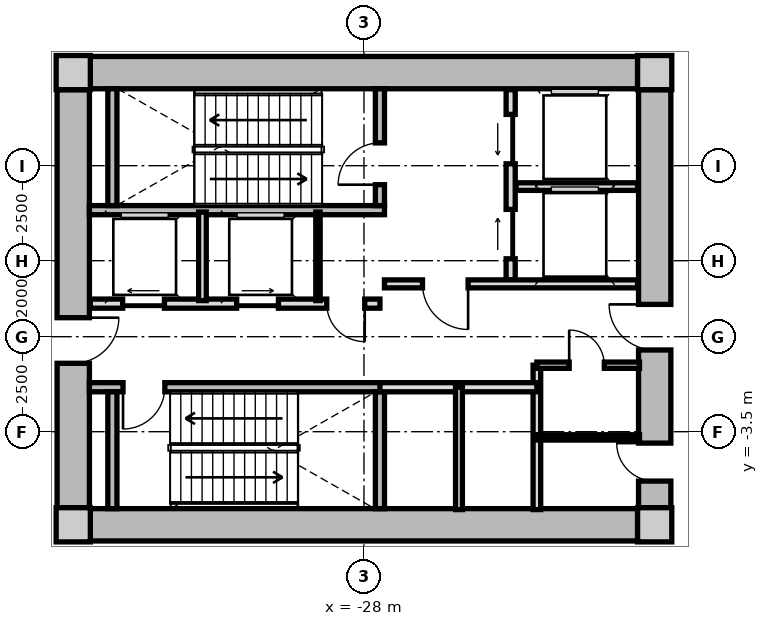
"""IFC4 building model, lengths in metres.
Left out: names, types, materials, properties, quantities, classifications, styles, units other than length and angle.
Written with IfcOpenShell. Run it as: python <this file> out.ifc"""

import sys

from ifc_helpers import new_model, si_unit, direction, frame, frame_2d, origin, origin_2d, place, context, subcontext, project, spatial, rectangle, extrude, source, transform, mapped, element, fill, save


model = new_model("IFC4")
c1 = context("Model", 3, precision=1e-05, world=origin(), true_north=direction((0.0, 1.0)))
c2 = subcontext(c1, "Body", "Model", "MODEL_VIEW")
j1 = project(units=[si_unit("LENGTHUNIT", "METRE"), si_unit("PLANEANGLEUNIT", "RADIAN")], contexts=[c1])
p1 = place(None, origin())
s1 = spatial("IfcSite", under=j1, at=p1, CompositionType="ELEMENT")
p2 = place(p1, origin())
s2 = spatial("IfcBuilding", under=s1, at=p2, CompositionType="ELEMENT")
p3 = place(p2, frame((0.0, 0.0, 16.8)))
s3 = spatial("IfcBuildingStorey", under=s2, at=p3, CompositionType="ELEMENT", Elevation=16.8)
m1 = source(origin(), c2, "Body", "SweptSolid", [
    extrude(rectangle(XDim=0.9, YDim=0.9, at=origin_2d()), origin(), (0.0, 0.0, 1.0), 4.8),
])
for number, where, z_axis, x_axis in (
    (1, (-35.65, -5.95, 0.0), (0.0, 0.0, 1.0), (1.0, 0.0, 0.0)),
    (2, (-20.35, -5.95, 0.0), (0.0, 0.0, 1.0), (1.0, 0.0, 0.0)),
    (3, (-20.35, 5.95, 0.0), (0.0, 0.0, 1.0), (1.0, 0.0, 0.0)),
    (4, (-35.65, 5.95, 0.0), (0.0, 0.0, 1.0), (1.0, 0.0, 0.0)),
):
    element("IfcColumn", number, at=place(p3, frame(where, z_axis=z_axis, x_axis=x_axis)), inside=s3, PredefinedType="COLUMN", context=c2, shape_type="MappedRepresentation", body=[
        mapped(m1, transform((0.0, 0.0, 0.0), x_axis=(1.0, 0.0, 0.0), y_axis=(0.0, 1.0, 0.0), z_axis=(0.0, 0.0, 1.0), scale=1.0)),
    ])
m2 = source(origin(), c2, "Body", "SweptSolid", [
    extrude(rectangle(XDim=14.4, YDim=0.85, at=frame_2d((7.2, 0.0))), origin(), (0.0, 0.0, 1.0), 4.38),
])
for number, where, z_axis, x_axis in (
    (5, (-35.2, 5.95, 0.0), (0.0, 0.0, 1.0), (1.0, 0.0, 0.0)),
    (6, (-20.8, -5.95, 0.0), (0.0, 0.0, 1.0), (-1.0, 0.0, 0.0)),
):
    element("IfcWall", number, at=place(p3, frame(where, z_axis=z_axis, x_axis=x_axis)), inside=s3, PredefinedType="SHEAR", context=c2, shape_type="MappedRepresentation", body=[
        mapped(m2, transform((0.0, 0.0, 0.0), x_axis=(1.0, 0.0, 0.0), y_axis=(0.0, 1.0, 0.0), z_axis=(0.0, 0.0, 1.0), scale=1.0)),
    ])
m3 = source(origin(), c2, "Body", "SweptSolid", [
    extrude(rectangle(XDim=11.0, YDim=0.85, at=frame_2d((5.5, 0.0))), origin(), (0.0, 0.0, 1.0), 4.38),
])
p4 = place(p3, frame((-35.65, -5.5, 0.0), z_axis=(0.0, 0.0, 1.0), x_axis=(0.0, 1.0, 0.0)))
e7 = element("IfcWall", 7, at=p4, inside=s3, PredefinedType="SHEAR", context=c2, shape_type="MappedRepresentation", body=[
    mapped(m3, transform((0.0, 0.0, 0.0), x_axis=(1.0, 0.0, 0.0), y_axis=(0.0, 1.0, 0.0), z_axis=(0.0, 0.0, 1.0), scale=1.0)),
])
p5 = place(p4, frame((3.8, 0.0, 0.0)))
e8 = element("IfcOpeningElement", 8, at=p5, cuts=e7, PredefinedType="OPENING", context=c2, shape_type="SweptSolid", body=[
    extrude(rectangle(XDim=1.2, YDim=2.15, at=frame_2d((0.6, 1.075))), frame((0.0, 0.435, 0.0), z_axis=(0.0, -1.0, 0.0), x_axis=(1.0, 0.0, 0.0)), (0.0, 0.0, 1.0), 0.87),
])
p6 = place(p3, frame((-20.35, 5.5, 0.0), z_axis=(0.0, 0.0, 1.0), x_axis=(0.0, -1.0, 0.0)))
e9 = element("IfcWall", 9, at=p6, inside=s3, PredefinedType="SHEAR", context=c2, shape_type="MappedRepresentation", body=[
    mapped(m3, transform((0.0, 0.0, 0.0), x_axis=(1.0, 0.0, 0.0), y_axis=(0.0, 1.0, 0.0), z_axis=(0.0, 0.0, 1.0), scale=1.0)),
])
p7 = place(p6, frame((5.65, 0.0, 0.0)))
e10 = element("IfcOpeningElement", 10, at=p7, cuts=e9, PredefinedType="OPENING", context=c2, shape_type="SweptSolid", body=[
    extrude(rectangle(XDim=1.2, YDim=2.15, at=frame_2d((0.6, 1.075))), frame((0.0, 0.435, 0.0), z_axis=(0.0, -1.0, 0.0), x_axis=(1.0, 0.0, 0.0)), (0.0, 0.0, 1.0), 0.87),
])
p8 = place(p6, frame((9.3, 0.0, 0.0)))
e11 = element("IfcOpeningElement", 11, at=p8, cuts=e9, PredefinedType="OPENING", context=c2, shape_type="SweptSolid", body=[
    extrude(rectangle(XDim=1.0, YDim=2.1, at=frame_2d((0.5, 1.05))), frame((0.0, 0.435, 0.0), z_axis=(0.0, -1.0, 0.0), x_axis=(1.0, 0.0, 0.0)), (0.0, 0.0, 1.0), 0.87),
])
m4 = source(origin(), c2, "Body", "SweptSolid", [
    extrude(rectangle(XDim=7.765, YDim=0.24, at=frame_2d((3.883, 0.0))), origin(), (0.0, 0.0, 1.0), 4.38),
])
p9 = place(p3, frame((-35.225, 2.33, 0.0), z_axis=(0.0, 0.0, 1.0), x_axis=(1.0, 0.0, 0.0)))
e12 = element("IfcWall", 12, at=p9, inside=s3, PredefinedType="PARTITIONING", context=c2, shape_type="MappedRepresentation", body=[
    mapped(m4, transform((0.0, 0.0, 0.0), x_axis=(1.0, 0.0, 0.0), y_axis=(0.0, 1.0, 0.0), z_axis=(0.0, 0.0, 1.0), scale=1.0)),
])
m5 = source(origin(), c2, "Body", "SweptSolid", [
    extrude(rectangle(XDim=3.075, YDim=0.24, at=frame_2d((1.538, 0.0))), origin(), (0.0, 0.0, 1.0), 4.38),
])
p10 = place(p3, frame((-34.62, 2.45, 0.0), z_axis=(0.0, 0.0, 1.0), x_axis=(0.0, 1.0, 0.0)))
e13 = element("IfcWall", 13, at=p10, inside=s3, PredefinedType="PARTITIONING", context=c2, shape_type="MappedRepresentation", body=[
    mapped(m5, transform((0.0, 0.0, 0.0), x_axis=(1.0, 0.0, 0.0), y_axis=(0.0, 1.0, 0.0), z_axis=(0.0, 0.0, 1.0), scale=1.0)),
])
p11 = place(p3, frame((-27.58, 2.45, 0.0), z_axis=(0.0, 0.0, 1.0), x_axis=(0.0, 1.0, 0.0)))
e14 = element("IfcWall", 14, at=p11, inside=s3, PredefinedType="PARTITIONING", context=c2, shape_type="MappedRepresentation", body=[
    mapped(m5, transform((0.0, 0.0, 0.0), x_axis=(1.0, 0.0, 0.0), y_axis=(0.0, 1.0, 0.0), z_axis=(0.0, 0.0, 1.0), scale=1.0)),
])
p12 = place(p11, frame((0.55, 0.0, 0.0)))
e15 = element("IfcOpeningElement", 15, at=p12, cuts=e14, PredefinedType="OPENING", context=c2, shape_type="SweptSolid", body=[
    extrude(rectangle(XDim=1.1, YDim=2.15, at=frame_2d((0.55, 1.075))), frame((0.0, 0.13, 0.0), z_axis=(0.0, -1.0, 0.0), x_axis=(1.0, 0.0, 0.0)), (0.0, 0.0, 1.0), 0.26),
])
p13 = place(p3, frame((-35.225, -2.33, 0.0), z_axis=(0.0, 0.0, 1.0), x_axis=(1.0, 0.0, 0.0)))
e16 = element("IfcWall", 16, at=p13, inside=s3, PredefinedType="PARTITIONING", context=c2, shape_type="MappedRepresentation", body=[
    mapped(m4, transform((0.0, 0.0, 0.0), x_axis=(1.0, 0.0, 0.0), y_axis=(0.0, 1.0, 0.0), z_axis=(0.0, 0.0, 1.0), scale=1.0)),
])
p14 = place(p13, frame((0.885, 0.0, 0.0)))
e17 = element("IfcOpeningElement", 17, at=p14, cuts=e16, PredefinedType="OPENING", context=c2, shape_type="SweptSolid", body=[
    extrude(rectangle(XDim=1.1, YDim=2.15, at=frame_2d((0.55, 1.075))), frame((0.0, 0.13, 0.0), z_axis=(0.0, -1.0, 0.0), x_axis=(1.0, 0.0, 0.0)), (0.0, 0.0, 1.0), 0.26),
])
for number, where, z_axis, x_axis in (
    (18, (-34.62, -5.525, 0.0), (0.0, 0.0, 1.0), (0.0, 1.0, 0.0)),
    (19, (-27.58, -5.525, 0.0), (0.0, 0.0, 1.0), (0.0, 1.0, 0.0)),
):
    element("IfcWall", number, at=place(p3, frame(where, z_axis=z_axis, x_axis=x_axis)), inside=s3, PredefinedType="PARTITIONING", context=c2, shape_type="MappedRepresentation", body=[
        mapped(m5, transform((0.0, 0.0, 0.0), x_axis=(1.0, 0.0, 0.0), y_axis=(0.0, 1.0, 0.0), z_axis=(0.0, 0.0, 1.0), scale=1.0)),
    ])
m6 = source(origin(), c2, "Body", "SweptSolid", [
    extrude(rectangle(XDim=5.0, YDim=0.24, at=frame_2d((2.5, 0.0))), origin(), (0.0, 0.0, 1.0), 4.365),
])
p15 = place(p3, frame((-24.14, 0.5, 0.0), z_axis=(0.0, 0.0, 1.0), x_axis=(0.0, 1.0, 0.0)))
e20 = element("IfcWall", 20, at=p15, inside=s3, PredefinedType="PARTITIONING", context=c2, shape_type="MappedRepresentation", body=[
    mapped(m6, transform((0.0, 0.0, 0.0), x_axis=(1.0, 0.0, 0.0), y_axis=(0.0, 1.0, 0.0), z_axis=(0.0, 0.0, 1.0), scale=1.0)),
])
p16 = place(p15, frame((3.05, 0.0, 0.0)))
e21 = element("IfcOpeningElement", 21, at=p16, cuts=e20, PredefinedType="OPENING", context=c2, shape_type="SweptSolid", body=[
    extrude(rectangle(XDim=1.3, YDim=2.2, at=frame_2d((0.65, 1.1))), frame((0.0, 0.13, 0.0), z_axis=(0.0, -1.0, 0.0), x_axis=(1.0, 0.0, 0.0)), (0.0, 0.0, 1.0), 0.26),
])
p17 = place(p15, frame((0.55, 0.0, 0.0)))
e22 = element("IfcOpeningElement", 22, at=p17, cuts=e20, PredefinedType="OPENING", context=c2, shape_type="SweptSolid", body=[
    extrude(rectangle(XDim=1.3, YDim=2.2, at=frame_2d((0.65, 1.1))), frame((0.0, 0.13, 0.0), z_axis=(0.0, -1.0, 0.0), x_axis=(1.0, 0.0, 0.0)), (0.0, 0.0, 1.0), 0.26),
])
m7 = source(origin(), c2, "Body", "SweptSolid", [
    extrude(rectangle(XDim=3.2, YDim=0.2, at=frame_2d((1.6, 0.0))), origin(), (0.0, 0.0, 1.0), 4.365),
])
p18 = place(p3, frame((-24.0, 2.95, 0.0), z_axis=(0.0, 0.0, 1.0), x_axis=(1.0, 0.0, 0.0)))
e23 = element("IfcWall", 23, at=p18, inside=s3, PredefinedType="PARTITIONING", context=c2, shape_type="MappedRepresentation", body=[
    mapped(m7, transform((0.0, 0.0, 0.0), x_axis=(1.0, 0.0, 0.0), y_axis=(0.0, 1.0, 0.0), z_axis=(0.0, 0.0, 1.0), scale=1.0)),
])
m8 = source(origin(), c2, "Body", "SweptSolid", [
    extrude(rectangle(XDim=6.66, YDim=0.21, at=frame_2d((3.33, 0.0))), origin(), (0.0, 0.0, 1.0), 4.365),
])
p19 = place(p3, frame((-27.46, 0.39, 0.0), z_axis=(0.0, 0.0, 1.0), x_axis=(1.0, 0.0, 0.0)))
e24 = element("IfcWall", 24, at=p19, inside=s3, PredefinedType="PARTITIONING", context=c2, shape_type="MappedRepresentation", body=[
    mapped(m8, transform((0.0, 0.0, 0.0), x_axis=(1.0, 0.0, 0.0), y_axis=(0.0, 1.0, 0.0), z_axis=(0.0, 0.0, 1.0), scale=1.0)),
])
p20 = place(p19, frame((1.0, 0.0, 0.0)))
e25 = element("IfcOpeningElement", 25, at=p20, cuts=e24, PredefinedType="OPENING", context=c2, shape_type="SweptSolid", body=[
    extrude(rectangle(XDim=1.2, YDim=2.15, at=frame_2d((0.6, 1.075))), frame((0.0, 0.115, 0.0), z_axis=(0.0, -1.0, 0.0), x_axis=(1.0, 0.0, 0.0)), (0.0, 0.0, 1.0), 0.23),
])
m9 = source(origin(), c2, "Body", "SweptSolid", [
    extrude(rectangle(XDim=7.62, YDim=0.24, at=frame_2d((3.81, 0.0))), origin(), (0.0, 0.0, 1.0), 4.365),
])
p21 = place(p3, frame((-35.2, -0.13, 0.0), z_axis=(0.0, 0.0, 1.0), x_axis=(1.0, 0.0, 0.0)))
e26 = element("IfcWall", 26, at=p21, inside=s3, PredefinedType="PARTITIONING", context=c2, shape_type="MappedRepresentation", body=[
    mapped(m9, transform((0.0, 0.0, 0.0), x_axis=(1.0, 0.0, 0.0), y_axis=(0.0, 1.0, 0.0), z_axis=(0.0, 0.0, 1.0), scale=1.0)),
])
p22 = place(p21, frame((6.22, 0.0, 0.0)))
e27 = element("IfcOpeningElement", 27, at=p22, cuts=e26, PredefinedType="OPENING", context=c2, shape_type="SweptSolid", body=[
    extrude(rectangle(XDim=1.0, YDim=2.1, at=frame_2d((0.5, 1.05))), frame((0.0, 0.13, 0.0), z_axis=(0.0, -1.0, 0.0), x_axis=(1.0, 0.0, 0.0)), (0.0, 0.0, 1.0), 0.26),
])
p23 = place(p21, frame((0.85, 0.0, 0.0)))
e28 = element("IfcOpeningElement", 28, at=p23, cuts=e26, PredefinedType="OPENING", context=c2, shape_type="SweptSolid", body=[
    extrude(rectangle(XDim=1.1, YDim=2.2, at=frame_2d((0.55, 1.1))), frame((0.0, 0.13, 0.0), z_axis=(0.0, -1.0, 0.0), x_axis=(1.0, 0.0, 0.0)), (0.0, 0.0, 1.0), 0.26),
])
p24 = place(p21, frame((3.85, 0.0, 0.0)))
e29 = element("IfcOpeningElement", 29, at=p24, cuts=e26, PredefinedType="OPENING", context=c2, shape_type="SweptSolid", body=[
    extrude(rectangle(XDim=1.1, YDim=2.2, at=frame_2d((0.55, 1.1))), frame((0.0, 0.13, 0.0), z_axis=(0.0, -1.0, 0.0), x_axis=(1.0, 0.0, 0.0)), (0.0, 0.0, 1.0), 0.26),
])
m10 = source(origin(), c2, "Body", "SweptSolid", [
    extrude(rectangle(XDim=2.33, YDim=0.115, at=frame_2d((1.165, 0.0))), origin(), (0.0, 0.0, 1.0), 4.365),
])
p25 = place(p3, frame((-29.21, -0.05, 0.0), z_axis=(0.0, 0.0, 1.0), x_axis=(0.0, 1.0, 0.0)))
e30 = element("IfcWall", 30, at=p25, inside=s3, PredefinedType="PARTITIONING", context=c2, shape_type="MappedRepresentation", body=[
    mapped(m10, transform((0.0, 0.0, 0.0), x_axis=(1.0, 0.0, 0.0), y_axis=(0.0, 1.0, 0.0), z_axis=(0.0, 0.0, 1.0), scale=1.0)),
])
m11 = source(origin(), c2, "Body", "SweptSolid", [
    extrude(rectangle(XDim=2.33, YDim=0.2, at=frame_2d((1.165, 0.0))), origin(), (0.0, 0.0, 1.0), 4.365),
])
p26 = place(p3, frame((-32.25, -0.05, 0.0), z_axis=(0.0, 0.0, 1.0), x_axis=(0.0, 1.0, 0.0)))
e31 = element("IfcWall", 31, at=p26, inside=s3, PredefinedType="PARTITIONING", context=c2, shape_type="MappedRepresentation", body=[
    mapped(m11, transform((0.0, 0.0, 0.0), x_axis=(1.0, 0.0, 0.0), y_axis=(0.0, 1.0, 0.0), z_axis=(0.0, 0.0, 1.0), scale=1.0)),
])
m12 = source(origin(), c2, "Body", "SweptSolid", [
    extrude(rectangle(XDim=3.8, YDim=0.2, at=frame_2d((1.9, 0.0))), origin(), (0.0, 0.0, 1.0), 4.365),
])
p27 = place(p3, frame((-23.45, -5.55, 0.0), z_axis=(0.0, 0.0, 1.0), x_axis=(0.0, 1.0, 0.0)))
e32 = element("IfcWall", 32, at=p27, inside=s3, PredefinedType="PARTITIONING", context=c2, shape_type="MappedRepresentation", body=[
    mapped(m12, transform((0.0, 0.0, 0.0), x_axis=(1.0, 0.0, 0.0), y_axis=(0.0, 1.0, 0.0), z_axis=(0.0, 0.0, 1.0), scale=1.0)),
])
m13 = source(origin(), c2, "Body", "SweptSolid", [
    extrude(rectangle(XDim=4.13, YDim=0.24, at=frame_2d((2.065, 0.0))), origin(), (0.0, 0.0, 1.0), 4.365),
])
p28 = place(p3, frame((-27.58, -2.33, 0.0), z_axis=(0.0, 0.0, 1.0), x_axis=(1.0, 0.0, 0.0)))
e33 = element("IfcWall", 33, at=p28, inside=s3, PredefinedType="PARTITIONING", context=c2, shape_type="MappedRepresentation", body=[
    mapped(m13, transform((0.0, 0.0, 0.0), x_axis=(1.0, 0.0, 0.0), y_axis=(0.0, 1.0, 0.0), z_axis=(0.0, 0.0, 1.0), scale=1.0)),
])
m14 = source(origin(), c2, "Body", "SweptSolid", [
    extrude(rectangle(XDim=3.22, YDim=0.18, at=frame_2d((1.61, 0.0))), origin(), (0.0, 0.0, 1.0), 4.365),
])
p29 = place(p3, frame((-25.5, -5.55, 0.0), z_axis=(0.0, 0.0, 1.0), x_axis=(0.0, 1.0, 0.0)))
e34 = element("IfcWall", 34, at=p29, inside=s3, PredefinedType="PARTITIONING", context=c2, shape_type="MappedRepresentation", body=[
    mapped(m14, transform((0.0, 0.0, 0.0), x_axis=(1.0, 0.0, 0.0), y_axis=(0.0, 1.0, 0.0), z_axis=(0.0, 0.0, 1.0), scale=1.0)),
])
m15 = source(origin(), c2, "Body", "SweptSolid", [
    extrude(rectangle(XDim=2.7, YDim=0.165, at=frame_2d((1.35, 0.0))), origin(), (0.0, 0.0, 1.0), 4.365),
])
p30 = place(p3, frame((-23.45, -1.75, 0.0), z_axis=(0.0, 0.0, 1.0), x_axis=(1.0, 0.0, 0.0)))
e35 = element("IfcWall", 35, at=p30, inside=s3, PredefinedType="PARTITIONING", context=c2, shape_type="MappedRepresentation", body=[
    mapped(m15, transform((0.0, 0.0, 0.0), x_axis=(1.0, 0.0, 0.0), y_axis=(0.0, 1.0, 0.0), z_axis=(0.0, 0.0, 1.0), scale=1.0)),
])
p31 = place(p30, frame((0.85, 0.0, 0.0)))
e36 = element("IfcOpeningElement", 36, at=p31, cuts=e35, PredefinedType="OPENING", context=c2, shape_type="SweptSolid", body=[
    extrude(rectangle(XDim=0.925, YDim=2.1, at=frame_2d((0.462, 1.05))), frame((0.0, 0.093, 0.0), z_axis=(0.0, -1.0, 0.0), x_axis=(1.0, 0.0, 0.0)), (0.0, 0.0, 1.0), 0.185),
])
m16 = source(origin(), c2, "Body", "SweptSolid", [
    extrude(rectangle(XDim=2.7, YDim=0.14, at=frame_2d((1.35, 0.0))), origin(), (0.0, 0.0, 1.0), 4.365),
])
p32 = place(p3, frame((-23.45, -3.65, 0.0), z_axis=(0.0, 0.0, 1.0), x_axis=(1.0, 0.0, 0.0)))
e37 = element("IfcWall", 37, at=p32, inside=s3, PredefinedType="PARTITIONING", context=c2, shape_type="MappedRepresentation", body=[
    mapped(m16, transform((0.0, 0.0, 0.0), x_axis=(1.0, 0.0, 0.0), y_axis=(0.0, 1.0, 0.0), z_axis=(0.0, 0.0, 1.0), scale=1.0)),
])
m17 = source(origin(), c2, "Body", "SweptSolid", [
    extrude(rectangle(XDim=1.1, YDim=2.15, at=frame_2d((0.55, 1.075))), frame((0.0, 0.025, 0.0), z_axis=(0.0, -1.0, 0.0), x_axis=(1.0, 0.0, 0.0)), (0.0, 0.0, 1.0), 0.05),
])
p33 = place(p12, origin())
e38 = element("IfcDoor", 38, at=p33, inside=s3, OperationType="SINGLE_SWING_LEFT", PredefinedType="DOOR", context=c2, shape_type="MappedRepresentation", body=[
    mapped(m17, transform((0.0, 0.0, 0.0), x_axis=(1.0, 0.0, 0.0), y_axis=(0.0, 1.0, 0.0), z_axis=(0.0, 0.0, 1.0), scale=1.0)),
])
fill(e15, e38)
p34 = place(p14, frame((1.1, 0.0, 0.0), z_axis=(0.0, 0.0, 1.0), x_axis=(-1.0, 0.0, 0.0)))
e39 = element("IfcDoor", 39, at=p34, inside=s3, OperationType="SINGLE_SWING_RIGHT", PredefinedType="DOOR", context=c2, shape_type="MappedRepresentation", body=[
    mapped(m17, transform((0.0, 0.0, 0.0), x_axis=(1.0, 0.0, 0.0), y_axis=(0.0, 1.0, 0.0), z_axis=(0.0, 0.0, 1.0), scale=1.0)),
])
fill(e17, e39)
m18 = source(origin(), c2, "Body", "SweptSolid", [
    extrude(rectangle(XDim=1.3, YDim=2.2, at=frame_2d((0.65, 1.1))), frame((0.0, 0.025, 0.0), z_axis=(0.0, -1.0, 0.0), x_axis=(1.0, 0.0, 0.0)), (0.0, 0.0, 1.0), 0.05),
])
p35 = place(p16, origin())
e40 = element("IfcDoor", 40, at=p35, inside=s3, OperationType="SLIDING_TO_LEFT", PredefinedType="DOOR", context=c2, shape_type="MappedRepresentation", body=[
    mapped(m18, transform((0.0, 0.0, 0.0), x_axis=(1.0, 0.0, 0.0), y_axis=(0.0, 1.0, 0.0), z_axis=(0.0, 0.0, 1.0), scale=1.0)),
])
fill(e21, e40)
p36 = place(p17, origin())
e41 = element("IfcDoor", 41, at=p36, inside=s3, OperationType="SLIDING_TO_RIGHT", PredefinedType="DOOR", context=c2, shape_type="MappedRepresentation", body=[
    mapped(m18, transform((0.0, 0.0, 0.0), x_axis=(1.0, 0.0, 0.0), y_axis=(0.0, 1.0, 0.0), z_axis=(0.0, 0.0, 1.0), scale=1.0)),
])
fill(e22, e41)
m19 = source(origin(), c2, "Body", "SweptSolid", [
    extrude(rectangle(XDim=1.2, YDim=2.15, at=frame_2d((0.6, 1.075))), frame((0.0, 0.025, 0.0), z_axis=(0.0, -1.0, 0.0), x_axis=(1.0, 0.0, 0.0)), (0.0, 0.0, 1.0), 0.05),
])
p37 = place(p20, frame((1.2, 0.0, 0.0), z_axis=(0.0, 0.0, 1.0), x_axis=(-1.0, 0.0, 0.0)))
e42 = element("IfcDoor", 42, at=p37, inside=s3, OperationType="SINGLE_SWING_LEFT", PredefinedType="DOOR", context=c2, shape_type="MappedRepresentation", body=[
    mapped(m19, transform((0.0, 0.0, 0.0), x_axis=(1.0, 0.0, 0.0), y_axis=(0.0, 1.0, 0.0), z_axis=(0.0, 0.0, 1.0), scale=1.0)),
])
fill(e25, e42)
p38 = place(p5, frame((1.2, 0.0, 0.0), z_axis=(0.0, 0.0, 1.0), x_axis=(-1.0, 0.0, 0.0)))
e43 = element("IfcDoor", 43, at=p38, inside=s3, OperationType="SINGLE_SWING_LEFT", PredefinedType="DOOR", context=c2, shape_type="MappedRepresentation", body=[
    mapped(m19, transform((0.0, 0.0, 0.0), x_axis=(1.0, 0.0, 0.0), y_axis=(0.0, 1.0, 0.0), z_axis=(0.0, 0.0, 1.0), scale=1.0)),
])
fill(e8, e43)
p39 = place(p7, frame((1.2, 0.0, 0.0), z_axis=(0.0, 0.0, 1.0), x_axis=(-1.0, 0.0, 0.0)))
e44 = element("IfcDoor", 44, at=p39, inside=s3, OperationType="SINGLE_SWING_RIGHT", PredefinedType="DOOR", context=c2, shape_type="MappedRepresentation", body=[
    mapped(m19, transform((0.0, 0.0, 0.0), x_axis=(1.0, 0.0, 0.0), y_axis=(0.0, 1.0, 0.0), z_axis=(0.0, 0.0, 1.0), scale=1.0)),
])
fill(e10, e44)
m20 = source(origin(), c2, "Body", "SweptSolid", [
    extrude(rectangle(XDim=1.0, YDim=2.1, at=frame_2d((0.5, 1.05))), frame((0.0, 0.025, 0.0), z_axis=(0.0, -1.0, 0.0), x_axis=(1.0, 0.0, 0.0)), (0.0, 0.0, 1.0), 0.05),
])
p40 = place(p22, frame((1.0, 0.0, 0.0), z_axis=(0.0, 0.0, 1.0), x_axis=(-1.0, 0.0, 0.0)))
e45 = element("IfcDoor", 45, at=p40, inside=s3, OperationType="SINGLE_SWING_LEFT", PredefinedType="DOOR", context=c2, shape_type="MappedRepresentation", body=[
    mapped(m20, transform((0.0, 0.0, 0.0), x_axis=(1.0, 0.0, 0.0), y_axis=(0.0, 1.0, 0.0), z_axis=(0.0, 0.0, 1.0), scale=1.0)),
])
fill(e27, e45)
m21 = source(origin(), c2, "Body", "SweptSolid", [
    extrude(rectangle(XDim=1.1, YDim=2.2, at=frame_2d((0.55, 1.1))), frame((0.0, 0.025, 0.0), z_axis=(0.0, -1.0, 0.0), x_axis=(1.0, 0.0, 0.0)), (0.0, 0.0, 1.0), 0.05),
])
p41 = place(p23, origin())
e46 = element("IfcDoor", 46, at=p41, inside=s3, OperationType="SLIDING_TO_LEFT", PredefinedType="DOOR", context=c2, shape_type="MappedRepresentation", body=[
    mapped(m21, transform((0.0, 0.0, 0.0), x_axis=(1.0, 0.0, 0.0), y_axis=(0.0, 1.0, 0.0), z_axis=(0.0, 0.0, 1.0), scale=1.0)),
])
fill(e28, e46)
p42 = place(p24, origin())
e47 = element("IfcDoor", 47, at=p42, inside=s3, OperationType="SLIDING_TO_RIGHT", PredefinedType="DOOR", context=c2, shape_type="MappedRepresentation", body=[
    mapped(m21, transform((0.0, 0.0, 0.0), x_axis=(1.0, 0.0, 0.0), y_axis=(0.0, 1.0, 0.0), z_axis=(0.0, 0.0, 1.0), scale=1.0)),
])
fill(e29, e47)
m22 = source(origin(), c2, "Body", "SweptSolid", [
    extrude(rectangle(XDim=0.925, YDim=2.1, at=frame_2d((0.462, 1.05))), frame((0.0, 0.025, 0.0), z_axis=(0.0, -1.0, 0.0), x_axis=(1.0, 0.0, 0.0)), (0.0, 0.0, 1.0), 0.05),
])
p43 = place(p31, origin())
e48 = element("IfcDoor", 48, at=p43, inside=s3, OperationType="SINGLE_SWING_LEFT", PredefinedType="DOOR", context=c2, shape_type="MappedRepresentation", body=[
    mapped(m22, transform((0.0, 0.0, 0.0), x_axis=(1.0, 0.0, 0.0), y_axis=(0.0, 1.0, 0.0), z_axis=(0.0, 0.0, 1.0), scale=1.0)),
])
fill(e36, e48)
p44 = place(p8, frame((1.0, 0.0, 0.0), z_axis=(0.0, 0.0, 1.0), x_axis=(-1.0, 0.0, 0.0)))
e49 = element("IfcDoor", 49, at=p44, inside=s3, OperationType="SINGLE_SWING_RIGHT", PredefinedType="DOOR", context=c2, shape_type="MappedRepresentation", body=[
    mapped(m20, transform((0.0, 0.0, 0.0), x_axis=(1.0, 0.0, 0.0), y_axis=(0.0, 1.0, 0.0), z_axis=(0.0, 0.0, 1.0), scale=1.0)),
])
fill(e11, e49)
save(model, sys.argv[1])
